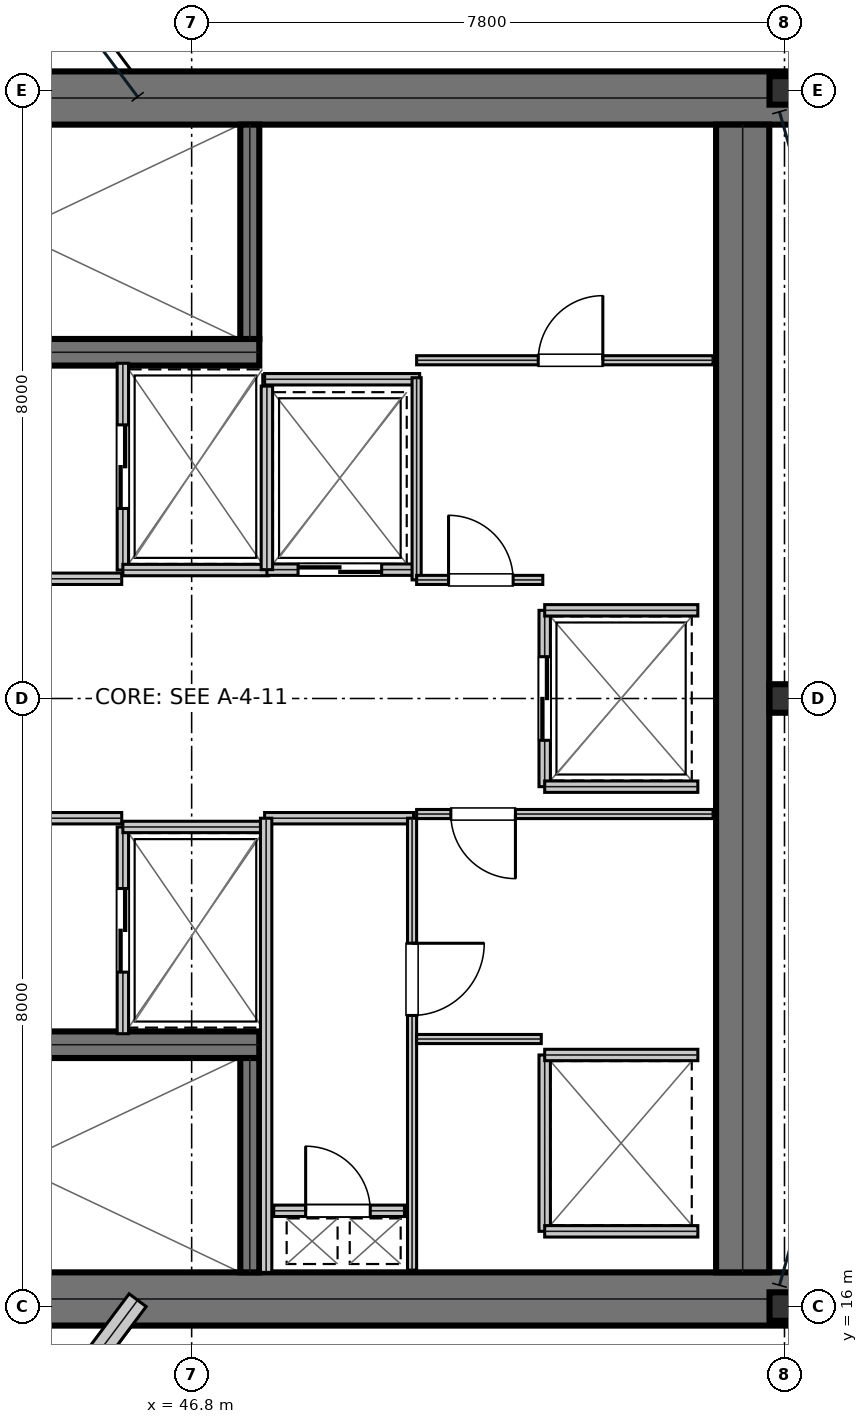
"""IFC4 building model, lengths in metres.
Left out: names, types, materials, properties, quantities, classifications, styles, units other than length and angle.
Written with IfcOpenShell. Run it as: python <this file> out.ifc"""

import sys

from ifc_helpers import new_model, si_unit, direction, frame, frame_2d, origin, origin_2d, place, context, subcontext, project, spatial, rectangle, i_section, extrude, element, fill, save


model = new_model("IFC4")
c1 = context("Model", 3, precision=1e-05, world=origin(), true_north=direction((0.0, 1.0)))
c2 = subcontext(c1, "Body", "Model", "MODEL_VIEW")
j1 = project(units=[si_unit("LENGTHUNIT", "METRE"), si_unit("PLANEANGLEUNIT", "RADIAN")], contexts=[c1])
p1 = place(None, origin())
s1 = spatial("IfcSite", under=j1, at=p1, CompositionType="ELEMENT")
p2 = place(p1, origin())
s2 = spatial("IfcBuilding", under=s1, at=p2, CompositionType="ELEMENT")
p3 = place(p2, frame((0.0, 0.0, 236.4)))
s3 = spatial("IfcBuildingStorey", under=s2, at=p3, CompositionType="ELEMENT", Elevation=236.4)
for number, where, z_axis, x_axis in (
    (1, (38.8, 31.9, 0.0), (0.0, 0.0, 1.0), (1.0, 0.0, 0.0)),
    (2, (38.8, 16.1, 0.0), (0.0, 0.0, 1.0), (1.0, 0.0, 0.0)),
):
    element("IfcWall", number, at=place(p3, frame(where, z_axis=z_axis, x_axis=x_axis)), inside=s3, PredefinedType="SHEAR", context=c2, shape_type="SweptSolid", body=[
        extrude(rectangle(XDim=16.0, YDim=0.7, at=frame_2d((8.0, 0.0))), origin(), (0.0, 0.0, 1.0), 3.79),
    ])
p4 = place(p3, frame((54.05, 16.45, 0.0), z_axis=(0.0, 0.0, 1.0), x_axis=(0.0, 1.0, 0.0)))
e3 = element("IfcWall", 3, at=p4, inside=s3, PredefinedType="SHEAR", context=c2, shape_type="SweptSolid", body=[
    extrude(rectangle(XDim=15.1, YDim=0.7, at=frame_2d((7.55, 0.0))), origin(), (0.0, 0.0, 1.0), 3.79),
])
p5 = place(p3, frame((39.98, 28.555, 0.0), z_axis=(0.0, 0.0, 1.0), x_axis=(1.0, 0.0, 0.0)))
e4 = element("IfcWall", 4, at=p5, inside=s3, PredefinedType="SHEAR", context=c2, shape_type="SweptSolid", body=[
    extrude(rectangle(XDim=7.71, YDim=0.35, at=frame_2d((3.855, 0.0))), origin(), (0.0, 0.0, 1.0), 3.79),
])
p6 = place(p5, frame((0.25, 0.0, 0.0)))
e5 = element("IfcOpeningElement", 5, at=p6, cuts=e4, PredefinedType="OPENING", context=c2, shape_type="SweptSolid", body=[
    extrude(rectangle(XDim=1.1, YDim=2.15, at=frame_2d((0.55, 1.075))), frame((0.0, 0.185, 0.0), z_axis=(0.0, -1.0, 0.0), x_axis=(1.0, 0.0, 0.0)), (0.0, 0.0, 1.0), 0.37),
])
p7 = place(p3, frame((39.98, 19.445, 0.0), z_axis=(0.0, 0.0, 1.0), x_axis=(1.0, 0.0, 0.0)))
e6 = element("IfcWall", 6, at=p7, inside=s3, PredefinedType="SHEAR", context=c2, shape_type="SweptSolid", body=[
    extrude(rectangle(XDim=7.71, YDim=0.35, at=frame_2d((3.855, 0.0))), origin(), (0.0, 0.0, 1.0), 3.79),
])
p8 = place(p7, frame((0.25, 0.0, 0.0)))
e7 = element("IfcOpeningElement", 7, at=p8, cuts=e6, PredefinedType="OPENING", context=c2, shape_type="SweptSolid", body=[
    extrude(rectangle(XDim=1.1, YDim=2.15, at=frame_2d((0.55, 1.075))), frame((0.0, 0.185, 0.0), z_axis=(0.0, -1.0, 0.0), x_axis=(1.0, 0.0, 0.0)), (0.0, 0.0, 1.0), 0.37),
])
for number, where, z_axis, x_axis in (
    (8, (47.565, 28.73, 0.0), (0.0, 0.0, 1.0), (0.0, 1.0, 0.0)),
    (9, (47.565, 16.45, 0.0), (0.0, 0.0, 1.0), (0.0, 1.0, 0.0)),
):
    element("IfcWall", number, at=place(p3, frame(where, z_axis=z_axis, x_axis=x_axis)), inside=s3, PredefinedType="SHEAR", context=c2, shape_type="SweptSolid", body=[
        extrude(rectangle(XDim=2.82, YDim=0.25, at=frame_2d((1.41, 0.0))), origin(), (0.0, 0.0, 1.0), 3.79),
    ])
for number, where, z_axis, x_axis in (
    (10, (54.6, 16.0, 0.0), (0.0, 0.0, 1.0), (1.0, 0.0, 0.0)),
    (11, (54.6, 24.0, 0.0), (0.0, 0.0, 1.0), (1.0, 0.0, 0.0)),
    (12, (54.6, 32.0, 0.0), (0.0, 0.0, 1.0), (1.0, 0.0, 0.0)),
):
    element("IfcColumn", number, at=place(p3, frame(where, z_axis=z_axis, x_axis=x_axis)), inside=s3, PredefinedType="COLUMN", context=c2, shape_type="SweptSolid", body=[
        extrude(i_section(OverallWidth=0.394, OverallDepth=0.375, WebThickness=0.017, FlangeThickness=0.028, at=origin_2d()), origin(), (0.0, 0.0, 1.0), 4.044),
    ])
p9 = place(p3, frame((43.932, 13.2, 0.0), z_axis=(0.0, 0.0, 1.0), x_axis=(0.599012599487, 0.800739599156, 0.0)))
e13 = element("IfcWall", 13, at=p9, inside=s3, PredefinedType="STANDARD", context=c2, shape_type="SweptSolid", body=[
    extrude(rectangle(XDim=3.602, YDim=0.28, at=frame_2d((1.801, 0.0))), origin(), (0.0, 0.0, 1.0), 3.319),
])
p10 = place(p3, frame((39.98, 25.575, 0.0), z_axis=(0.0, 0.0, 1.0), x_axis=(1.0, 0.0, 0.0)))
e14 = element("IfcWall", 14, at=p10, inside=s3, PredefinedType="PARTITIONING", context=c2, shape_type="SweptSolid", body=[
    extrude(rectangle(XDim=5.9, YDim=0.15, at=frame_2d((2.95, 0.0))), origin(), (0.0, 0.0, 1.0), 3.79),
])
p11 = place(p10, frame((2.35, 0.0, 0.0)))
e15 = element("IfcOpeningElement", 15, at=p11, cuts=e14, PredefinedType="OPENING", context=c2, shape_type="SweptSolid", body=[
    extrude(rectangle(XDim=1.05, YDim=2.15, at=frame_2d((0.525, 1.075))), frame((0.0, 0.085, 0.0), z_axis=(0.0, -1.0, 0.0), x_axis=(1.0, 0.0, 0.0)), (0.0, 0.0, 1.0), 0.17),
])
p12 = place(p3, frame((39.98, 22.425, 0.0), z_axis=(0.0, 0.0, 1.0), x_axis=(1.0, 0.0, 0.0)))
e16 = element("IfcWall", 16, at=p12, inside=s3, PredefinedType="PARTITIONING", context=c2, shape_type="SweptSolid", body=[
    extrude(rectangle(XDim=5.9, YDim=0.15, at=frame_2d((2.95, 0.0))), origin(), (0.0, 0.0, 1.0), 3.79),
])
p13 = place(p12, frame((2.35, 0.0, 0.0)))
e17 = element("IfcOpeningElement", 17, at=p13, cuts=e16, PredefinedType="OPENING", context=c2, shape_type="SweptSolid", body=[
    extrude(rectangle(XDim=1.05, YDim=2.15, at=frame_2d((0.525, 1.075))), frame((0.0, 0.085, 0.0), z_axis=(0.0, -1.0, 0.0), x_axis=(1.0, 0.0, 0.0)), (0.0, 0.0, 1.0), 0.17),
])
p14 = place(p3, frame((45.895, 25.69, 0.0), z_axis=(0.0, 0.0, 1.0), x_axis=(0.0, 1.0, 0.0)))
e18 = element("IfcWall", 18, at=p14, inside=s3, PredefinedType="PARTITIONING", context=c2, shape_type="SweptSolid", body=[
    extrude(rectangle(XDim=2.72, YDim=0.15, at=frame_2d((1.36, 0.0))), origin(), (0.0, 0.0, 1.0), 3.79),
])
p15 = place(p14, frame((0.81, 0.0, 0.0)))
e19 = element("IfcOpeningElement", 19, at=p15, cuts=e18, PredefinedType="OPENING", context=c2, shape_type="SweptSolid", body=[
    extrude(rectangle(XDim=1.1, YDim=2.15, at=frame_2d((0.55, 1.075))), frame((0.0, 0.085, 0.0), z_axis=(0.0, -1.0, 0.0), x_axis=(1.0, 0.0, 0.0)), (0.0, 0.0, 1.0), 0.17),
])
p16 = place(p3, frame((45.895, 25.69, 0.0), z_axis=(0.0, 0.0, 1.0), x_axis=(1.0, 0.0, 0.0)))
e20 = element("IfcWall", 20, at=p16, inside=s3, PredefinedType="PARTITIONING", context=c2, shape_type="SweptSolid", body=[
    extrude(rectangle(XDim=1.915, YDim=0.15, at=frame_2d((0.958, 0.0))), origin(), (0.0, 0.0, 1.0), 3.79),
])
p17 = place(p3, frame((45.895, 19.59, 0.0), z_axis=(0.0, 0.0, 1.0), x_axis=(0.0, 1.0, 0.0)))
e21 = element("IfcWall", 21, at=p17, inside=s3, PredefinedType="PARTITIONING", context=c2, shape_type="SweptSolid", body=[
    extrude(rectangle(XDim=2.72, YDim=0.15, at=frame_2d((1.36, 0.0))), origin(), (0.0, 0.0, 1.0), 3.79),
])
p18 = place(p17, frame((0.81, 0.0, 0.0)))
e22 = element("IfcOpeningElement", 22, at=p18, cuts=e21, PredefinedType="OPENING", context=c2, shape_type="SweptSolid", body=[
    extrude(rectangle(XDim=1.1, YDim=2.15, at=frame_2d((0.55, 1.075))), frame((0.0, 0.085, 0.0), z_axis=(0.0, -1.0, 0.0), x_axis=(1.0, 0.0, 0.0)), (0.0, 0.0, 1.0), 0.17),
])
p19 = place(p3, frame((45.895, 22.31, 0.0), z_axis=(0.0, 0.0, 1.0), x_axis=(1.0, 0.0, 0.0)))
e23 = element("IfcWall", 23, at=p19, inside=s3, PredefinedType="PARTITIONING", context=c2, shape_type="SweptSolid", body=[
    extrude(rectangle(XDim=1.915, YDim=0.15, at=frame_2d((0.958, 0.0))), origin(), (0.0, 0.0, 1.0), 3.79),
])
p20 = place(p3, frame((47.79, 25.695, 0.0), z_axis=(0.0, 0.0, 1.0), x_axis=(1.0, 0.0, 0.0)))
e24 = element("IfcWall", 24, at=p20, inside=s3, PredefinedType="PARTITIONING", context=c2, shape_type="SweptSolid", body=[
    extrude(rectangle(XDim=1.92, YDim=0.15, at=frame_2d((0.96, 0.0))), origin(), (0.0, 0.0, 1.0), 3.79),
])
p21 = place(p20, frame((0.41, 0.0, 0.0)))
e25 = element("IfcOpeningElement", 25, at=p21, cuts=e24, PredefinedType="OPENING", context=c2, shape_type="SweptSolid", body=[
    extrude(rectangle(XDim=1.1, YDim=2.15, at=frame_2d((0.55, 1.075))), frame((0.0, 0.085, 0.0), z_axis=(0.0, -1.0, 0.0), x_axis=(1.0, 0.0, 0.0)), (0.0, 0.0, 1.0), 0.17),
])
p22 = place(p3, frame((47.79, 25.695, 0.0), z_axis=(0.0, 0.0, 1.0), x_axis=(0.0, 1.0, 0.0)))
e26 = element("IfcWall", 26, at=p22, inside=s3, PredefinedType="PARTITIONING", context=c2, shape_type="SweptSolid", body=[
    extrude(rectangle(XDim=2.415, YDim=0.15, at=frame_2d((1.208, 0.0))), origin(), (0.0, 0.0, 1.0), 3.79),
])
p23 = place(p3, frame((51.445, 22.84, 0.0), z_axis=(0.0, 0.0, 1.0), x_axis=(0.0, 1.0, 0.0)))
e27 = element("IfcWall", 27, at=p23, inside=s3, PredefinedType="PARTITIONING", context=c2, shape_type="SweptSolid", body=[
    extrude(rectangle(XDim=2.32, YDim=0.15, at=frame_2d((1.16, 0.0))), origin(), (0.0, 0.0, 1.0), 3.79),
])
p24 = place(p23, frame((0.61, 0.0, 0.0)))
e28 = element("IfcOpeningElement", 28, at=p24, cuts=e27, PredefinedType="OPENING", context=c2, shape_type="SweptSolid", body=[
    extrude(rectangle(XDim=1.1, YDim=2.15, at=frame_2d((0.55, 1.075))), frame((0.0, 0.085, 0.0), z_axis=(0.0, -1.0, 0.0), x_axis=(1.0, 0.0, 0.0)), (0.0, 0.0, 1.0), 0.17),
])
for number, where, z_axis, x_axis in (
    (29, (51.445, 22.84, 0.0), (0.0, 0.0, 1.0), (1.0, 0.0, 0.0)),
    (30, (51.445, 25.16, 0.0), (0.0, 0.0, 1.0), (1.0, 0.0, 0.0)),
):
    element("IfcWall", number, at=place(p3, frame(where, z_axis=z_axis, x_axis=x_axis)), inside=s3, PredefinedType="PARTITIONING", context=c2, shape_type="SweptSolid", body=[
        extrude(rectangle(XDim=2.015, YDim=0.15, at=frame_2d((1.007, 0.0))), origin(), (0.0, 0.0, 1.0), 3.79),
    ])
p25 = place(p3, frame((51.445, 16.99, 0.0), z_axis=(0.0, 0.0, 1.0), x_axis=(0.0, 1.0, 0.0)))
e31 = element("IfcWall", 31, at=p25, inside=s3, PredefinedType="PARTITIONING", context=c2, shape_type="SweptSolid", body=[
    extrude(rectangle(XDim=2.32, YDim=0.15, at=frame_2d((1.16, 0.0))), origin(), (0.0, 0.0, 1.0), 3.79),
])
for number, where, z_axis, x_axis in (
    (32, (51.445, 16.99, 0.0), (0.0, 0.0, 1.0), (1.0, 0.0, 0.0)),
    (33, (51.445, 19.31, 0.0), (0.0, 0.0, 1.0), (1.0, 0.0, 0.0)),
):
    element("IfcWall", number, at=place(p3, frame(where, z_axis=z_axis, x_axis=x_axis)), inside=s3, PredefinedType="PARTITIONING", context=c2, shape_type="SweptSolid", body=[
        extrude(rectangle(XDim=2.015, YDim=0.15, at=frame_2d((1.007, 0.0))), origin(), (0.0, 0.0, 1.0), 3.79),
    ])
p26 = place(p3, frame((47.88, 17.26, 0.0), z_axis=(0.0, 0.0, 1.0), x_axis=(1.0, 0.0, 0.0)))
e34 = element("IfcWall", 34, at=p26, inside=s3, PredefinedType="PARTITIONING", context=c2, shape_type="SweptSolid", body=[
    extrude(rectangle(XDim=1.72, YDim=0.15, at=frame_2d((0.86, 0.0))), origin(), (0.0, 0.0, 1.0), 3.79),
])
p27 = place(p26, frame((0.42, 0.0, 0.0)))
e35 = element("IfcOpeningElement", 35, at=p27, cuts=e34, PredefinedType="OPENING", context=c2, shape_type="SweptSolid", body=[
    extrude(rectangle(XDim=0.85, YDim=2.15, at=frame_2d((0.425, 1.075))), frame((0.0, 0.085, 0.0), z_axis=(0.0, -1.0, 0.0), x_axis=(1.0, 0.0, 0.0)), (0.0, 0.0, 1.0), 0.17),
])
p28 = place(p3, frame((47.76, 22.425, 0.0), z_axis=(0.0, 0.0, 1.0), x_axis=(1.0, 0.0, 0.0)))
e36 = element("IfcWall", 36, at=p28, inside=s3, PredefinedType="PARTITIONING", context=c2, shape_type="SweptSolid", body=[
    extrude(rectangle(XDim=1.96, YDim=0.15, at=frame_2d((0.98, 0.0))), origin(), (0.0, 0.0, 1.0), 3.79),
])
p29 = place(p3, frame((47.78, 16.45, 0.0), z_axis=(0.0, 0.0, 1.0), x_axis=(0.0, 1.0, 0.0)))
e37 = element("IfcWall", 37, at=p29, inside=s3, PredefinedType="PARTITIONING", context=c2, shape_type="SweptSolid", body=[
    extrude(rectangle(XDim=5.975, YDim=0.15, at=frame_2d((2.988, 0.0))), origin(), (0.0, 0.0, 1.0), 3.79),
])
p30 = place(p3, frame((49.7, 16.48, 0.0), z_axis=(0.0, 0.0, 1.0), x_axis=(0.0, 1.0, 0.0)))
e38 = element("IfcWall", 38, at=p30, inside=s3, PredefinedType="PARTITIONING", context=c2, shape_type="SweptSolid", body=[
    extrude(rectangle(XDim=5.945, YDim=0.12, at=frame_2d((2.973, 0.0))), origin(), (0.0, 0.0, 1.0), 3.79),
])
p31 = place(p30, frame((3.35, 0.0, 0.0)))
e39 = element("IfcOpeningElement", 39, at=p31, cuts=e38, PredefinedType="OPENING", context=c2, shape_type="SweptSolid", body=[
    extrude(rectangle(XDim=0.95, YDim=2.15, at=frame_2d((0.475, 1.075))), frame((0.0, 0.07, 0.0), z_axis=(0.0, -1.0, 0.0), x_axis=(1.0, 0.0, 0.0)), (0.0, 0.0, 1.0), 0.14),
])
p32 = place(p3, frame((49.76, 22.48, 0.0), z_axis=(0.0, 0.0, 1.0), x_axis=(1.0, 0.0, 0.0)))
e40 = element("IfcWall", 40, at=p32, inside=s3, PredefinedType="PARTITIONING", context=c2, shape_type="SweptSolid", body=[
    extrude(rectangle(XDim=3.9, YDim=0.12, at=frame_2d((1.95, 0.0))), origin(), (0.0, 0.0, 1.0), 3.79),
])
p33 = place(p32, frame((0.45, 0.0, 0.0)))
e41 = element("IfcOpeningElement", 41, at=p33, cuts=e40, PredefinedType="OPENING", context=c2, shape_type="SweptSolid", body=[
    extrude(rectangle(XDim=0.85, YDim=2.15, at=frame_2d((0.425, 1.075))), frame((0.0, 0.07, 0.0), z_axis=(0.0, -1.0, 0.0), x_axis=(1.0, 0.0, 0.0)), (0.0, 0.0, 1.0), 0.14),
])
p34 = place(p3, frame((49.76, 19.52, 0.0), z_axis=(0.0, 0.0, 1.0), x_axis=(1.0, 0.0, 0.0)))
e42 = element("IfcWall", 42, at=p34, inside=s3, PredefinedType="PARTITIONING", context=c2, shape_type="SweptSolid", body=[
    extrude(rectangle(XDim=1.64, YDim=0.12, at=frame_2d((0.82, 0.0))), origin(), (0.0, 0.0, 1.0), 3.79),
])
p35 = place(p3, frame((47.76, 28.2, 0.0), z_axis=(0.0, 0.0, 1.0), x_axis=(1.0, 0.0, 0.0)))
e43 = element("IfcWall", 43, at=p35, inside=s3, PredefinedType="PARTITIONING", context=c2, shape_type="SweptSolid", body=[
    extrude(rectangle(XDim=2.04, YDim=0.15, at=frame_2d((1.02, 0.0))), origin(), (0.0, 0.0, 1.0), 3.79),
])
p36 = place(p3, frame((49.76, 25.56, 0.0), z_axis=(0.0, 0.0, 1.0), x_axis=(0.0, 1.0, 0.0)))
e44 = element("IfcWall", 44, at=p36, inside=s3, PredefinedType="PARTITIONING", context=c2, shape_type="SweptSolid", body=[
    extrude(rectangle(XDim=2.66, YDim=0.12, at=frame_2d((1.33, 0.0))), origin(), (0.0, 0.0, 1.0), 3.79),
])
p37 = place(p3, frame((49.76, 25.56, 0.0), z_axis=(0.0, 0.0, 1.0), x_axis=(1.0, 0.0, 0.0)))
e45 = element("IfcWall", 45, at=p37, inside=s3, PredefinedType="PARTITIONING", context=c2, shape_type="SweptSolid", body=[
    extrude(rectangle(XDim=1.66, YDim=0.12, at=frame_2d((0.83, 0.0))), origin(), (0.0, 0.0, 1.0), 3.79),
])
p38 = place(p37, frame((0.42, 0.0, 0.0)))
e46 = element("IfcOpeningElement", 46, at=p38, cuts=e45, PredefinedType="OPENING", context=c2, shape_type="SweptSolid", body=[
    extrude(rectangle(XDim=0.85, YDim=2.15, at=frame_2d((0.425, 1.075))), frame((0.0, 0.07, 0.0), z_axis=(0.0, -1.0, 0.0), x_axis=(1.0, 0.0, 0.0)), (0.0, 0.0, 1.0), 0.14),
])
p39 = place(p3, frame((49.76, 28.45, 0.0), z_axis=(0.0, 0.0, 1.0), x_axis=(1.0, 0.0, 0.0)))
e47 = element("IfcWall", 47, at=p39, inside=s3, PredefinedType="PARTITIONING", context=c2, shape_type="SweptSolid", body=[
    extrude(rectangle(XDim=3.9, YDim=0.12, at=frame_2d((1.95, 0.0))), origin(), (0.0, 0.0, 1.0), 3.79),
])
p40 = place(p39, frame((1.6, 0.0, 0.0)))
e48 = element("IfcOpeningElement", 48, at=p40, cuts=e47, PredefinedType="OPENING", context=c2, shape_type="SweptSolid", body=[
    extrude(rectangle(XDim=0.85, YDim=2.15, at=frame_2d((0.425, 1.075))), frame((0.0, 0.07, 0.0), z_axis=(0.0, -1.0, 0.0), x_axis=(1.0, 0.0, 0.0)), (0.0, 0.0, 1.0), 0.14),
])
p41 = place(p15, frame((1.1, 0.0, 0.0), z_axis=(0.0, 0.0, 1.0), x_axis=(-1.0, 0.0, 0.0)))
e49 = element("IfcDoor", 49, at=p41, inside=s3, OperationType="DOUBLE_DOOR_SLIDING", PredefinedType="DOOR", context=c2, shape_type="SweptSolid", body=[
    extrude(rectangle(XDim=1.1, YDim=2.15, at=frame_2d((0.55, 1.075))), frame((0.0, 0.025, 0.0), z_axis=(0.0, -1.0, 0.0), x_axis=(1.0, 0.0, 0.0)), (0.0, 0.0, 1.0), 0.05),
])
fill(e19, e49)
p42 = place(p18, frame((1.1, 0.0, 0.0), z_axis=(0.0, 0.0, 1.0), x_axis=(-1.0, 0.0, 0.0)))
e50 = element("IfcDoor", 50, at=p42, inside=s3, OperationType="DOUBLE_DOOR_SLIDING", PredefinedType="DOOR", context=c2, shape_type="SweptSolid", body=[
    extrude(rectangle(XDim=1.1, YDim=2.15, at=frame_2d((0.55, 1.075))), frame((0.0, 0.025, 0.0), z_axis=(0.0, -1.0, 0.0), x_axis=(1.0, 0.0, 0.0)), (0.0, 0.0, 1.0), 0.05),
])
fill(e22, e50)
p43 = place(p21, frame((1.1, 0.0, 0.0), z_axis=(0.0, 0.0, 1.0), x_axis=(-1.0, 0.0, 0.0)))
e51 = element("IfcDoor", 51, at=p43, inside=s3, OperationType="DOUBLE_DOOR_SLIDING", PredefinedType="DOOR", context=c2, shape_type="SweptSolid", body=[
    extrude(rectangle(XDim=1.1, YDim=2.15, at=frame_2d((0.55, 1.075))), frame((0.0, 0.025, 0.0), z_axis=(0.0, -1.0, 0.0), x_axis=(1.0, 0.0, 0.0)), (0.0, 0.0, 1.0), 0.05),
])
fill(e25, e51)
p44 = place(p24, frame((1.1, 0.0, 0.0), z_axis=(0.0, 0.0, 1.0), x_axis=(-1.0, 0.0, 0.0)))
e52 = element("IfcDoor", 52, at=p44, inside=s3, OperationType="DOUBLE_DOOR_SLIDING", PredefinedType="DOOR", context=c2, shape_type="SweptSolid", body=[
    extrude(rectangle(XDim=1.1, YDim=2.15, at=frame_2d((0.55, 1.075))), frame((0.0, 0.025, 0.0), z_axis=(0.0, -1.0, 0.0), x_axis=(1.0, 0.0, 0.0)), (0.0, 0.0, 1.0), 0.05),
])
fill(e28, e52)
p45 = place(p27, origin())
e53 = element("IfcDoor", 53, at=p45, inside=s3, OperationType="SINGLE_SWING_LEFT", PredefinedType="TRAPDOOR", context=c2, shape_type="SweptSolid", body=[
    extrude(rectangle(XDim=0.85, YDim=2.15, at=frame_2d((0.425, 1.075))), frame((0.0, 0.025, 0.0), z_axis=(0.0, -1.0, 0.0), x_axis=(1.0, 0.0, 0.0)), (0.0, 0.0, 1.0), 0.05),
])
fill(e35, e53)
p46 = place(p31, frame((0.95, 0.0, 0.0), z_axis=(0.0, 0.0, 1.0), x_axis=(-1.0, 0.0, 0.0)))
e54 = element("IfcDoor", 54, at=p46, inside=s3, OperationType="SINGLE_SWING_LEFT", PredefinedType="DOOR", context=c2, shape_type="SweptSolid", body=[
    extrude(rectangle(XDim=0.95, YDim=2.15, at=frame_2d((0.475, 1.075))), frame((0.0, 0.025, 0.0), z_axis=(0.0, -1.0, 0.0), x_axis=(1.0, 0.0, 0.0)), (0.0, 0.0, 1.0), 0.05),
])
fill(e39, e54)
p47 = place(p33, frame((0.85, 0.0, 0.0), z_axis=(0.0, 0.0, 1.0), x_axis=(-1.0, 0.0, 0.0)))
e55 = element("IfcDoor", 55, at=p47, inside=s3, OperationType="SINGLE_SWING_LEFT", PredefinedType="DOOR", context=c2, shape_type="SweptSolid", body=[
    extrude(rectangle(XDim=0.85, YDim=2.15, at=frame_2d((0.425, 1.075))), frame((0.0, 0.025, 0.0), z_axis=(0.0, -1.0, 0.0), x_axis=(1.0, 0.0, 0.0)), (0.0, 0.0, 1.0), 0.05),
])
fill(e41, e55)
p48 = place(p38, origin())
e56 = element("IfcDoor", 56, at=p48, inside=s3, OperationType="SINGLE_SWING_LEFT", PredefinedType="DOOR", context=c2, shape_type="SweptSolid", body=[
    extrude(rectangle(XDim=0.85, YDim=2.15, at=frame_2d((0.425, 1.075))), frame((0.0, 0.025, 0.0), z_axis=(0.0, -1.0, 0.0), x_axis=(1.0, 0.0, 0.0)), (0.0, 0.0, 1.0), 0.05),
])
fill(e46, e56)
p49 = place(p40, origin())
e57 = element("IfcDoor", 57, at=p49, inside=s3, OperationType="SINGLE_SWING_RIGHT", PredefinedType="DOOR", context=c2, shape_type="SweptSolid", body=[
    extrude(rectangle(XDim=0.85, YDim=2.15, at=frame_2d((0.425, 1.075))), frame((0.0, 0.025, 0.0), z_axis=(0.0, -1.0, 0.0), x_axis=(1.0, 0.0, 0.0)), (0.0, 0.0, 1.0), 0.05),
])
fill(e48, e57)
save(model, sys.argv[1])
